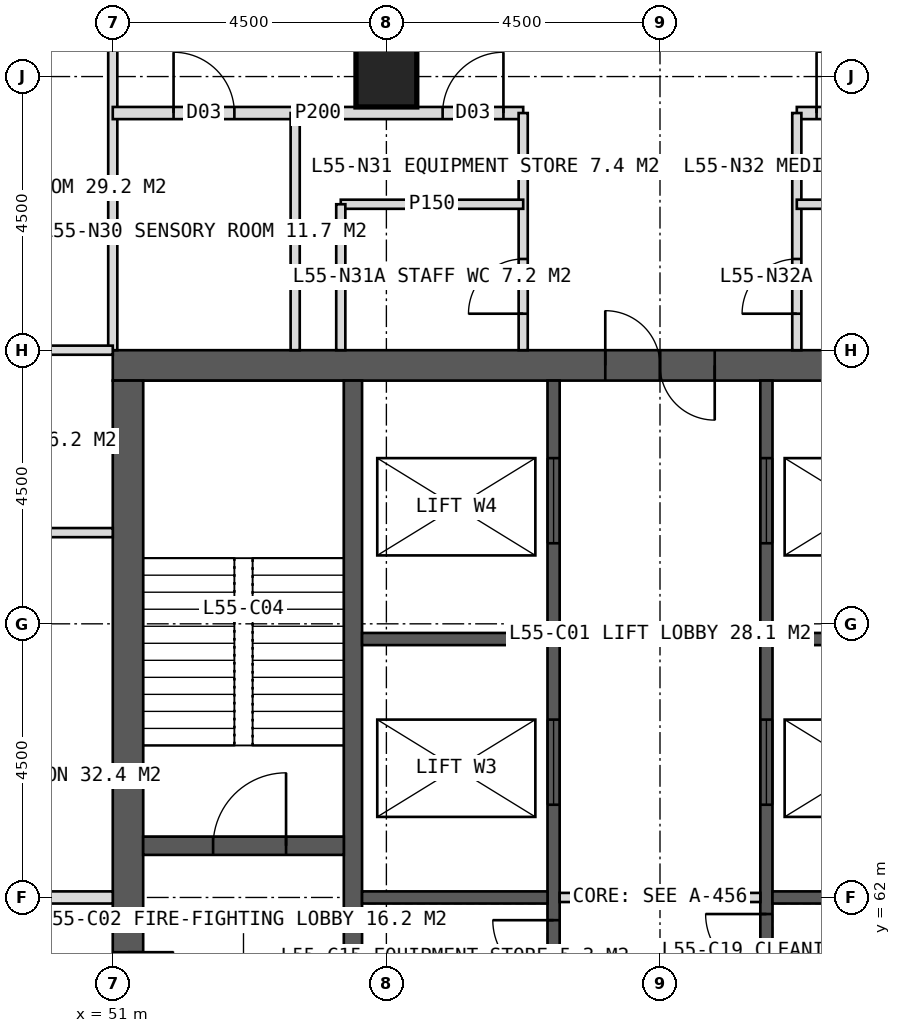
"""IFC4 building model, lengths in metres.
Left out: names, types, materials, properties, quantities, classifications, styles, units other than length and angle.
Written with IfcOpenShell. Run it as: python <this file> out.ifc"""

import sys

from ifc_helpers import new_model, si_unit, direction, frame, frame_2d, origin, origin_2d, place, context, subcontext, project, spatial, rectangle, hollow_rectangle, extrude, element, fill, save


model = new_model("IFC4")
c1 = context("Model", 3, precision=1e-05, world=origin(), true_north=direction((0.0, 1.0)))
c2 = subcontext(c1, "Body", "Model", "MODEL_VIEW")
j1 = project(units=[si_unit("LENGTHUNIT", "METRE"), si_unit("PLANEANGLEUNIT", "RADIAN")], contexts=[c1])
p1 = place(None, origin())
s1 = spatial("IfcSite", under=j1, at=p1, CompositionType="ELEMENT")
p2 = place(p1, origin())
s2 = spatial("IfcBuilding", under=s1, at=p2, CompositionType="ELEMENT")
p3 = place(p2, frame((0.0, 0.0, 229.0)))
s3 = spatial("IfcBuildingStorey", under=s2, at=p3, CompositionType="ELEMENT", Elevation=229.0)
p4 = place(p3, frame((51.0, 70.75, 0.0), z_axis=(0.0, 0.0, 1.0), x_axis=(1.0, 0.0, 0.0)))
e1 = element("IfcWall", 1, at=p4, inside=s3, PredefinedType="SHEAR", context=c2, shape_type="SweptSolid", body=[
    extrude(rectangle(XDim=18.0, YDim=0.5, at=frame_2d((9.0, 0.0))), origin(), (0.0, 0.0, 1.0), 4.0),
])
p5 = place(p4, frame((8.1, 0.0, 0.0)))
e2 = element("IfcOpeningElement", 2, at=p5, cuts=e1, PredefinedType="OPENING", context=c2, shape_type="SweptSolid", body=[
    extrude(rectangle(XDim=1.8, YDim=2.2, at=frame_2d((0.9, 1.1))), frame((0.0, 0.26, 0.0), z_axis=(0.0, -1.0, 0.0), x_axis=(1.0, 0.0, 0.0)), (0.0, 0.0, 1.0), 0.52),
])
p6 = place(p3, frame((51.25, 53.5, 0.0), z_axis=(0.0, 0.0, 1.0), x_axis=(0.0, 1.0, 0.0)))
e3 = element("IfcWall", 3, at=p6, inside=s3, PredefinedType="SHEAR", context=c2, shape_type="SweptSolid", body=[
    extrude(rectangle(XDim=17.0, YDim=0.5, at=frame_2d((8.5, 0.0))), origin(), (0.0, 0.0, 1.0), 4.0),
])
p7 = place(p6, frame((6.1, 0.0, 0.0)))
e4 = element("IfcOpeningElement", 4, at=p7, cuts=e3, PredefinedType="OPENING", context=c2, shape_type="SweptSolid", body=[
    extrude(rectangle(XDim=1.5, YDim=2.2, at=frame_2d((0.75, 1.1))), frame((0.0, 0.26, 0.0), z_axis=(0.0, -1.0, 0.0), x_axis=(1.0, 0.0, 0.0)), (0.0, 0.0, 1.0), 0.52),
])
p8 = place(p3, frame((54.95, 53.5, 0.0), z_axis=(0.0, 0.0, 1.0), x_axis=(0.0, 1.0, 0.0)))
e5 = element("IfcWall", 5, at=p8, inside=s3, PredefinedType="SHEAR", context=c2, shape_type="SweptSolid", body=[
    extrude(rectangle(XDim=17.0, YDim=0.3, at=frame_2d((8.5, 0.0))), origin(), (0.0, 0.0, 1.0), 4.0),
])
p9 = place(p3, frame((58.25, 53.5, 0.0), z_axis=(0.0, 0.0, 1.0), x_axis=(0.0, 1.0, 0.0)))
e6 = element("IfcWall", 6, at=p9, inside=s3, PredefinedType="SHEAR", context=c2, shape_type="SweptSolid", body=[
    extrude(rectangle(XDim=17.0, YDim=0.2, at=frame_2d((8.5, 0.0))), origin(), (0.0, 0.0, 1.0), 4.0),
])
p10 = place(p9, frame((0.496, 0.0, 0.0)))
e7 = element("IfcOpeningElement", 7, at=p10, cuts=e6, PredefinedType="OPENING", context=c2, shape_type="SweptSolid", body=[
    extrude(rectangle(XDim=1.0, YDim=2.1, at=frame_2d((0.5, 1.05))), frame((0.0, 0.11, 0.0), z_axis=(0.0, -1.0, 0.0), x_axis=(1.0, 0.0, 0.0)), (0.0, 0.0, 1.0), 0.22),
])
p11 = place(p9, frame((2.646, 0.0, 0.0)))
e8 = element("IfcOpeningElement", 8, at=p11, cuts=e6, PredefinedType="OPENING", context=c2, shape_type="SweptSolid", body=[
    extrude(rectangle(XDim=1.0, YDim=2.1, at=frame_2d((0.5, 1.05))), frame((0.0, 0.11, 0.0), z_axis=(0.0, -1.0, 0.0), x_axis=(1.0, 0.0, 0.0)), (0.0, 0.0, 1.0), 0.22),
])
p12 = place(p9, frame((5.027, 0.0, 0.0)))
e9 = element("IfcOpeningElement", 9, at=p12, cuts=e6, PredefinedType="OPENING", context=c2, shape_type="SweptSolid", body=[
    extrude(rectangle(XDim=1.0, YDim=2.1, at=frame_2d((0.5, 1.05))), frame((0.0, 0.11, 0.0), z_axis=(0.0, -1.0, 0.0), x_axis=(1.0, 0.0, 0.0)), (0.0, 0.0, 1.0), 0.22),
])
p13 = place(p9, frame((7.126, 0.0, 0.0)))
e10 = element("IfcOpeningElement", 10, at=p13, cuts=e6, PredefinedType="OPENING", context=c2, shape_type="SweptSolid", body=[
    extrude(rectangle(XDim=1.0, YDim=2.1, at=frame_2d((0.5, 1.05))), frame((0.0, 0.11, 0.0), z_axis=(0.0, -1.0, 0.0), x_axis=(1.0, 0.0, 0.0)), (0.0, 0.0, 1.0), 0.22),
])
p14 = place(p9, frame((10.025, 0.0, 0.0)))
e11 = element("IfcOpeningElement", 11, at=p14, cuts=e6, PredefinedType="OPENING", context=c2, shape_type="SweptSolid", body=[
    extrude(rectangle(XDim=1.4, YDim=2.2, at=frame_2d((0.7, 1.1))), frame((0.0, 0.11, 0.0), z_axis=(0.0, -1.0, 0.0), x_axis=(1.0, 0.0, 0.0)), (0.0, 0.0, 1.0), 0.22),
])
p15 = place(p9, frame((14.325, 0.0, 0.0)))
e12 = element("IfcOpeningElement", 12, at=p15, cuts=e6, PredefinedType="OPENING", context=c2, shape_type="SweptSolid", body=[
    extrude(rectangle(XDim=1.4, YDim=2.2, at=frame_2d((0.7, 1.1))), frame((0.0, 0.11, 0.0), z_axis=(0.0, -1.0, 0.0), x_axis=(1.0, 0.0, 0.0)), (0.0, 0.0, 1.0), 0.22),
])
p16 = place(p3, frame((61.75, 53.5, 0.0), z_axis=(0.0, 0.0, 1.0), x_axis=(0.0, 1.0, 0.0)))
e13 = element("IfcWall", 13, at=p16, inside=s3, PredefinedType="SHEAR", context=c2, shape_type="SweptSolid", body=[
    extrude(rectangle(XDim=17.0, YDim=0.2, at=frame_2d((8.5, 0.0))), origin(), (0.0, 0.0, 1.0), 4.0),
])
p17 = place(p16, frame((0.393, 0.0, 0.0)))
e14 = element("IfcOpeningElement", 14, at=p17, cuts=e13, PredefinedType="OPENING", context=c2, shape_type="SweptSolid", body=[
    extrude(rectangle(XDim=1.0, YDim=2.1, at=frame_2d((0.5, 1.05))), frame((0.0, 0.11, 0.0), z_axis=(0.0, -1.0, 0.0), x_axis=(1.0, 0.0, 0.0)), (0.0, 0.0, 1.0), 0.22),
])
p18 = place(p16, frame((2.542, 0.0, 0.0)))
e15 = element("IfcOpeningElement", 15, at=p18, cuts=e13, PredefinedType="OPENING", context=c2, shape_type="SweptSolid", body=[
    extrude(rectangle(XDim=1.0, YDim=2.1, at=frame_2d((0.5, 1.05))), frame((0.0, 0.11, 0.0), z_axis=(0.0, -1.0, 0.0), x_axis=(1.0, 0.0, 0.0)), (0.0, 0.0, 1.0), 0.22),
])
p19 = place(p16, frame((5.127, 0.0, 0.0)))
e16 = element("IfcOpeningElement", 16, at=p19, cuts=e13, PredefinedType="OPENING", context=c2, shape_type="SweptSolid", body=[
    extrude(rectangle(XDim=1.0, YDim=2.1, at=frame_2d((0.5, 1.05))), frame((0.0, 0.11, 0.0), z_axis=(0.0, -1.0, 0.0), x_axis=(1.0, 0.0, 0.0)), (0.0, 0.0, 1.0), 0.22),
])
p20 = place(p16, frame((7.228, 0.0, 0.0)))
e17 = element("IfcOpeningElement", 17, at=p20, cuts=e13, PredefinedType="OPENING", context=c2, shape_type="SweptSolid", body=[
    extrude(rectangle(XDim=1.0, YDim=2.1, at=frame_2d((0.5, 1.05))), frame((0.0, 0.11, 0.0), z_axis=(0.0, -1.0, 0.0), x_axis=(1.0, 0.0, 0.0)), (0.0, 0.0, 1.0), 0.22),
])
p21 = place(p16, frame((10.025, 0.0, 0.0)))
e18 = element("IfcOpeningElement", 18, at=p21, cuts=e13, PredefinedType="OPENING", context=c2, shape_type="SweptSolid", body=[
    extrude(rectangle(XDim=1.4, YDim=2.2, at=frame_2d((0.7, 1.1))), frame((0.0, 0.11, 0.0), z_axis=(0.0, -1.0, 0.0), x_axis=(1.0, 0.0, 0.0)), (0.0, 0.0, 1.0), 0.22),
])
p22 = place(p16, frame((14.325, 0.0, 0.0)))
e19 = element("IfcOpeningElement", 19, at=p22, cuts=e13, PredefinedType="OPENING", context=c2, shape_type="SweptSolid", body=[
    extrude(rectangle(XDim=1.4, YDim=2.2, at=frame_2d((0.7, 1.1))), frame((0.0, 0.11, 0.0), z_axis=(0.0, -1.0, 0.0), x_axis=(1.0, 0.0, 0.0)), (0.0, 0.0, 1.0), 0.22),
])
for number, where, z_axis, x_axis in (
    (20, (55.1, 62.0, 0.0), (0.0, 0.0, 1.0), (1.0, 0.0, 0.0)),
    (21, (61.85, 62.0, 0.0), (0.0, 0.0, 1.0), (1.0, 0.0, 0.0)),
    (22, (55.1, 66.25, 0.0), (0.0, 0.0, 1.0), (1.0, 0.0, 0.0)),
    (23, (61.85, 66.25, 0.0), (0.0, 0.0, 1.0), (1.0, 0.0, 0.0)),
):
    element("IfcWall", number, at=place(p3, frame(where, z_axis=z_axis, x_axis=x_axis)), inside=s3, PredefinedType="SHEAR", context=c2, shape_type="SweptSolid", body=[
        extrude(rectangle(XDim=3.05, YDim=0.2, at=frame_2d((1.525, 0.0))), origin(), (0.0, 0.0, 1.0), 4.0),
    ])
p23 = place(p3, frame((51.5, 62.85, 0.0), z_axis=(0.0, 0.0, 1.0), x_axis=(1.0, 0.0, 0.0)))
e24 = element("IfcWall", 24, at=p23, inside=s3, PredefinedType="SHEAR", context=c2, shape_type="SweptSolid", body=[
    extrude(rectangle(XDim=3.3, YDim=0.3, at=frame_2d((1.65, 0.0))), origin(), (0.0, 0.0, 1.0), 4.0),
])
p24 = place(p23, frame((1.15, 0.0, 0.0)))
e25 = element("IfcOpeningElement", 25, at=p24, cuts=e24, PredefinedType="OPENING", context=c2, shape_type="SweptSolid", body=[
    extrude(rectangle(XDim=1.2, YDim=2.1, at=frame_2d((0.6, 1.05))), frame((0.0, 0.16, 0.0), z_axis=(0.0, -1.0, 0.0), x_axis=(1.0, 0.0, 0.0)), (0.0, 0.0, 1.0), 0.32),
])
p25 = place(p3, frame((55.5, 75.5, 0.0), z_axis=(0.0, 0.0, 1.0), x_axis=(1.0, 0.0, 0.0)))
e26 = element("IfcColumn", 26, at=p25, inside=s3, PredefinedType="COLUMN", context=c2, shape_type="SweptSolid", body=[
    extrude(hollow_rectangle(XDim=1.0, YDim=1.0, WallThickness=0.1, at=origin_2d()), origin(), (0.0, 0.0, 1.0), 4.0),
])
p26 = place(p3, frame((51.0, 71.0, 0.0), z_axis=(0.0, 0.0, 1.0), x_axis=(0.0, 1.0, 0.0)))
e27 = element("IfcWall", 27, at=p26, inside=s3, PredefinedType="PARTITIONING", context=c2, shape_type="SweptSolid", body=[
    extrude(rectangle(XDim=5.4, YDim=0.15, at=frame_2d((2.7, 0.0))), origin(), (0.0, 0.0, 1.0), 3.75),
])
p27 = place(p3, frame((51.0, 74.9, 0.0), z_axis=(0.0, 0.0, 1.0), x_axis=(1.0, 0.0, 0.0)))
e28 = element("IfcWall", 28, at=p27, inside=s3, PredefinedType="PARTITIONING", context=c2, shape_type="SweptSolid", body=[
    extrude(rectangle(XDim=6.75, YDim=0.2, at=frame_2d((3.375, 0.0))), origin(), (0.0, 0.0, 1.0), 3.75),
])
p28 = place(p27, frame((1.0, 0.0, 0.0)))
e29 = element("IfcOpeningElement", 29, at=p28, cuts=e28, PredefinedType="OPENING", context=c2, shape_type="SweptSolid", body=[
    extrude(rectangle(XDim=1.0, YDim=2.1, at=frame_2d((0.5, 1.05))), frame((0.0, 0.11, 0.0), z_axis=(0.0, -1.0, 0.0), x_axis=(1.0, 0.0, 0.0)), (0.0, 0.0, 1.0), 0.22),
])
p29 = place(p27, frame((5.425, 0.0, 0.0)))
e30 = element("IfcOpeningElement", 30, at=p29, cuts=e28, PredefinedType="OPENING", context=c2, shape_type="SweptSolid", body=[
    extrude(rectangle(XDim=1.0, YDim=2.1, at=frame_2d((0.5, 1.05))), frame((0.0, 0.11, 0.0), z_axis=(0.0, -1.0, 0.0), x_axis=(1.0, 0.0, 0.0)), (0.0, 0.0, 1.0), 0.22),
])
p30 = place(p3, frame((62.25, 74.9, 0.0), z_axis=(0.0, 0.0, 1.0), x_axis=(1.0, 0.0, 0.0)))
e31 = element("IfcWall", 31, at=p30, inside=s3, PredefinedType="PARTITIONING", context=c2, shape_type="SweptSolid", body=[
    extrude(rectangle(XDim=6.75, YDim=0.2, at=frame_2d((3.375, 0.0))), origin(), (0.0, 0.0, 1.0), 3.75),
])
p31 = place(p30, frame((0.325, 0.0, 0.0)))
e32 = element("IfcOpeningElement", 32, at=p31, cuts=e31, PredefinedType="OPENING", context=c2, shape_type="SweptSolid", body=[
    extrude(rectangle(XDim=1.0, YDim=2.1, at=frame_2d((0.5, 1.05))), frame((0.0, 0.11, 0.0), z_axis=(0.0, -1.0, 0.0), x_axis=(1.0, 0.0, 0.0)), (0.0, 0.0, 1.0), 0.22),
])
p32 = place(p30, frame((5.5, 0.0, 0.0)))
e33 = element("IfcOpeningElement", 33, at=p32, cuts=e31, PredefinedType="OPENING", context=c2, shape_type="SweptSolid", body=[
    extrude(rectangle(XDim=1.0, YDim=2.1, at=frame_2d((0.5, 1.05))), frame((0.0, 0.11, 0.0), z_axis=(0.0, -1.0, 0.0), x_axis=(1.0, 0.0, 0.0)), (0.0, 0.0, 1.0), 0.22),
])
p33 = place(p3, frame((57.75, 71.0, 0.0), z_axis=(0.0, 0.0, 1.0), x_axis=(0.0, 1.0, 0.0)))
e34 = element("IfcWall", 34, at=p33, inside=s3, PredefinedType="PARTITIONING", context=c2, shape_type="SweptSolid", body=[
    extrude(rectangle(XDim=3.9, YDim=0.15, at=frame_2d((1.95, 0.0))), origin(), (0.0, 0.0, 1.0), 3.75),
])
p34 = place(p33, frame((0.6, 0.0, 0.0)))
e35 = element("IfcOpeningElement", 35, at=p34, cuts=e34, PredefinedType="OPENING", context=c2, shape_type="SweptSolid", body=[
    extrude(rectangle(XDim=0.9, YDim=2.1, at=frame_2d((0.45, 1.05))), frame((0.0, 0.085, 0.0), z_axis=(0.0, -1.0, 0.0), x_axis=(1.0, 0.0, 0.0)), (0.0, 0.0, 1.0), 0.17),
])
p35 = place(p3, frame((62.25, 71.0, 0.0), z_axis=(0.0, 0.0, 1.0), x_axis=(0.0, 1.0, 0.0)))
e36 = element("IfcWall", 36, at=p35, inside=s3, PredefinedType="PARTITIONING", context=c2, shape_type="SweptSolid", body=[
    extrude(rectangle(XDim=3.9, YDim=0.15, at=frame_2d((1.95, 0.0))), origin(), (0.0, 0.0, 1.0), 3.75),
])
p36 = place(p35, frame((0.6, 0.0, 0.0)))
e37 = element("IfcOpeningElement", 37, at=p36, cuts=e36, PredefinedType="OPENING", context=c2, shape_type="SweptSolid", body=[
    extrude(rectangle(XDim=0.9, YDim=2.1, at=frame_2d((0.45, 1.05))), frame((0.0, 0.085, 0.0), z_axis=(0.0, -1.0, 0.0), x_axis=(1.0, 0.0, 0.0)), (0.0, 0.0, 1.0), 0.17),
])
p37 = place(p3, frame((54.0, 71.0, 0.0), z_axis=(0.0, 0.0, 1.0), x_axis=(0.0, 1.0, 0.0)))
e38 = element("IfcWall", 38, at=p37, inside=s3, PredefinedType="PARTITIONING", context=c2, shape_type="SweptSolid", body=[
    extrude(rectangle(XDim=3.9, YDim=0.15, at=frame_2d((1.95, 0.0))), origin(), (0.0, 0.0, 1.0), 3.75),
])
p38 = place(p3, frame((54.75, 73.4, 0.0), z_axis=(0.0, 0.0, 1.0), x_axis=(1.0, 0.0, 0.0)))
e39 = element("IfcWall", 39, at=p38, inside=s3, PredefinedType="PARTITIONING", context=c2, shape_type="SweptSolid", body=[
    extrude(rectangle(XDim=3.0, YDim=0.15, at=frame_2d((1.5, 0.0))), origin(), (0.0, 0.0, 1.0), 3.75),
])
p39 = place(p3, frame((54.75, 71.0, 0.0), z_axis=(0.0, 0.0, 1.0), x_axis=(0.0, 1.0, 0.0)))
e40 = element("IfcWall", 40, at=p39, inside=s3, PredefinedType="PARTITIONING", context=c2, shape_type="SweptSolid", body=[
    extrude(rectangle(XDim=2.4, YDim=0.15, at=frame_2d((1.2, 0.0))), origin(), (0.0, 0.0, 1.0), 3.75),
])
p40 = place(p3, frame((62.25, 73.4, 0.0), z_axis=(0.0, 0.0, 1.0), x_axis=(1.0, 0.0, 0.0)))
e41 = element("IfcWall", 41, at=p40, inside=s3, PredefinedType="PARTITIONING", context=c2, shape_type="SweptSolid", body=[
    extrude(rectangle(XDim=3.0, YDim=0.15, at=frame_2d((1.5, 0.0))), origin(), (0.0, 0.0, 1.0), 3.75),
])
p41 = place(p3, frame((51.0, 62.0, 0.0), z_axis=(0.0, 0.0, 1.0), x_axis=(-1.0, 0.0, 0.0)))
e42 = element("IfcWall", 42, at=p41, inside=s3, PredefinedType="SOLIDWALL", context=c2, shape_type="SweptSolid", body=[
    extrude(rectangle(XDim=5.4, YDim=0.2, at=frame_2d((2.7, 0.0))), origin(), (0.0, 0.0, 1.0), 2.95),
])
for number, where, z_axis, x_axis in (
    (43, (51.0, 68.0, 0.0), (0.0, 0.0, 1.0), (-1.0, 0.0, 0.0)),
    (44, (51.0, 71.0, 0.0), (0.0, 0.0, 1.0), (-1.0, 0.0, 0.0)),
):
    element("IfcWall", number, at=place(p3, frame(where, z_axis=z_axis, x_axis=x_axis)), inside=s3, PredefinedType="PARTITIONING", context=c2, shape_type="SweptSolid", body=[
        extrude(rectangle(XDim=5.4, YDim=0.15, at=frame_2d((2.7, 0.0))), origin(), (0.0, 0.0, 1.0), 3.75),
    ])
p42 = place(p3, frame((58.35, 62.0, 0.0), z_axis=(0.0, 0.0, 1.0), x_axis=(1.0, 0.0, 0.0)))
e45 = element("IfcWall", 45, at=p42, inside=s3, PredefinedType="PARTITIONING", context=c2, shape_type="SweptSolid", body=[
    extrude(rectangle(XDim=3.3, YDim=0.15, at=frame_2d((1.65, 0.0))), origin(), (0.0, 0.0, 1.0), 3.75),
])
p43 = place(p28, origin())
e46 = element("IfcDoor", 46, at=p43, inside=s3, OperationType="SINGLE_SWING_LEFT", PredefinedType="DOOR", context=c2, shape_type="SweptSolid", body=[
    extrude(rectangle(XDim=1.0, YDim=2.1, at=frame_2d((0.5, 1.05))), frame((0.0, 0.025, 0.0), z_axis=(0.0, -1.0, 0.0), x_axis=(1.0, 0.0, 0.0)), (0.0, 0.0, 1.0), 0.05),
])
fill(e29, e46)
p44 = place(p34, origin())
e47 = element("IfcDoor", 47, at=p44, inside=s3, OperationType="SINGLE_SWING_LEFT", PredefinedType="DOOR", context=c2, shape_type="SweptSolid", body=[
    extrude(rectangle(XDim=0.9, YDim=2.1, at=frame_2d((0.45, 1.05))), frame((0.0, 0.025, 0.0), z_axis=(0.0, -1.0, 0.0), x_axis=(1.0, 0.0, 0.0)), (0.0, 0.0, 1.0), 0.05),
])
fill(e35, e47)
p45 = place(p29, origin())
e48 = element("IfcDoor", 48, at=p45, inside=s3, OperationType="SINGLE_SWING_RIGHT", PredefinedType="DOOR", context=c2, shape_type="SweptSolid", body=[
    extrude(rectangle(XDim=1.0, YDim=2.1, at=frame_2d((0.5, 1.05))), frame((0.0, 0.025, 0.0), z_axis=(0.0, -1.0, 0.0), x_axis=(1.0, 0.0, 0.0)), (0.0, 0.0, 1.0), 0.05),
])
fill(e30, e48)
p46 = place(p36, origin())
e49 = element("IfcDoor", 49, at=p46, inside=s3, OperationType="SINGLE_SWING_LEFT", PredefinedType="DOOR", context=c2, shape_type="SweptSolid", body=[
    extrude(rectangle(XDim=0.9, YDim=2.1, at=frame_2d((0.45, 1.05))), frame((0.0, 0.025, 0.0), z_axis=(0.0, -1.0, 0.0), x_axis=(1.0, 0.0, 0.0)), (0.0, 0.0, 1.0), 0.05),
])
fill(e37, e49)
p47 = place(p31, origin())
e50 = element("IfcDoor", 50, at=p47, inside=s3, OperationType="SINGLE_SWING_LEFT", PredefinedType="DOOR", context=c2, shape_type="SweptSolid", body=[
    extrude(rectangle(XDim=1.0, YDim=2.1, at=frame_2d((0.5, 1.05))), frame((0.0, 0.025, 0.0), z_axis=(0.0, -1.0, 0.0), x_axis=(1.0, 0.0, 0.0)), (0.0, 0.0, 1.0), 0.05),
])
fill(e32, e50)
p48 = place(p5, origin())
e51 = element("IfcDoor", 51, at=p48, inside=s3, OperationType="DOUBLE_DOOR_SINGLE_SWING", PredefinedType="DOOR", context=c2, shape_type="SweptSolid", body=[
    extrude(rectangle(XDim=1.8, YDim=2.2, at=frame_2d((0.9, 1.1))), frame((0.0, 0.025, 0.0), z_axis=(0.0, -1.0, 0.0), x_axis=(1.0, 0.0, 0.0)), (0.0, 0.0, 1.0), 0.05),
])
fill(e2, e51)
p49 = place(p7, origin())
e52 = element("IfcDoor", 52, at=p49, inside=s3, OperationType="DOUBLE_DOOR_SINGLE_SWING", PredefinedType="DOOR", context=c2, shape_type="SweptSolid", body=[
    extrude(rectangle(XDim=1.5, YDim=2.2, at=frame_2d((0.75, 1.1))), frame((0.0, 0.025, 0.0), z_axis=(0.0, -1.0, 0.0), x_axis=(1.0, 0.0, 0.0)), (0.0, 0.0, 1.0), 0.05),
])
fill(e4, e52)
p50 = place(p24, origin())
e53 = element("IfcDoor", 53, at=p50, inside=s3, OperationType="SINGLE_SWING_RIGHT", PredefinedType="DOOR", context=c2, shape_type="SweptSolid", body=[
    extrude(rectangle(XDim=1.2, YDim=2.1, at=frame_2d((0.6, 1.05))), frame((0.0, 0.025, 0.0), z_axis=(0.0, -1.0, 0.0), x_axis=(1.0, 0.0, 0.0)), (0.0, 0.0, 1.0), 0.05),
])
fill(e25, e53)
p51 = place(p13, origin())
e54 = element("IfcDoor", 54, at=p51, inside=s3, OperationType="SINGLE_SWING_RIGHT", PredefinedType="DOOR", context=c2, shape_type="SweptSolid", body=[
    extrude(rectangle(XDim=1.0, YDim=2.1, at=frame_2d((0.5, 1.05))), frame((0.0, 0.025, 0.0), z_axis=(0.0, -1.0, 0.0), x_axis=(1.0, 0.0, 0.0)), (0.0, 0.0, 1.0), 0.05),
])
fill(e10, e54)
p52 = place(p20, origin())
e55 = element("IfcDoor", 55, at=p52, inside=s3, OperationType="SINGLE_SWING_RIGHT", PredefinedType="DOOR", context=c2, shape_type="SweptSolid", body=[
    extrude(rectangle(XDim=1.0, YDim=2.1, at=frame_2d((0.5, 1.05))), frame((0.0, 0.025, 0.0), z_axis=(0.0, -1.0, 0.0), x_axis=(1.0, 0.0, 0.0)), (0.0, 0.0, 1.0), 0.05),
])
fill(e17, e55)
p53 = place(p14, origin())
e56 = element("IfcDoor", 56, at=p53, inside=s3, OperationType="SLIDING_TO_LEFT", PredefinedType="DOOR", context=c2, shape_type="SweptSolid", body=[
    extrude(rectangle(XDim=1.4, YDim=2.2, at=frame_2d((0.7, 1.1))), frame((0.0, 0.025, 0.0), z_axis=(0.0, -1.0, 0.0), x_axis=(1.0, 0.0, 0.0)), (0.0, 0.0, 1.0), 0.05),
])
fill(e11, e56)
p54 = place(p21, origin())
e57 = element("IfcDoor", 57, at=p54, inside=s3, OperationType="SLIDING_TO_LEFT", PredefinedType="DOOR", context=c2, shape_type="SweptSolid", body=[
    extrude(rectangle(XDim=1.4, YDim=2.2, at=frame_2d((0.7, 1.1))), frame((0.0, 0.025, 0.0), z_axis=(0.0, -1.0, 0.0), x_axis=(1.0, 0.0, 0.0)), (0.0, 0.0, 1.0), 0.05),
])
fill(e18, e57)
p55 = place(p15, origin())
e58 = element("IfcDoor", 58, at=p55, inside=s3, OperationType="SLIDING_TO_LEFT", PredefinedType="DOOR", context=c2, shape_type="SweptSolid", body=[
    extrude(rectangle(XDim=1.4, YDim=2.2, at=frame_2d((0.7, 1.1))), frame((0.0, 0.025, 0.0), z_axis=(0.0, -1.0, 0.0), x_axis=(1.0, 0.0, 0.0)), (0.0, 0.0, 1.0), 0.05),
])
fill(e12, e58)
p56 = place(p22, origin())
e59 = element("IfcDoor", 59, at=p56, inside=s3, OperationType="SLIDING_TO_LEFT", PredefinedType="DOOR", context=c2, shape_type="SweptSolid", body=[
    extrude(rectangle(XDim=1.4, YDim=2.2, at=frame_2d((0.7, 1.1))), frame((0.0, 0.025, 0.0), z_axis=(0.0, -1.0, 0.0), x_axis=(1.0, 0.0, 0.0)), (0.0, 0.0, 1.0), 0.05),
])
fill(e19, e59)
save(model, sys.argv[1])
